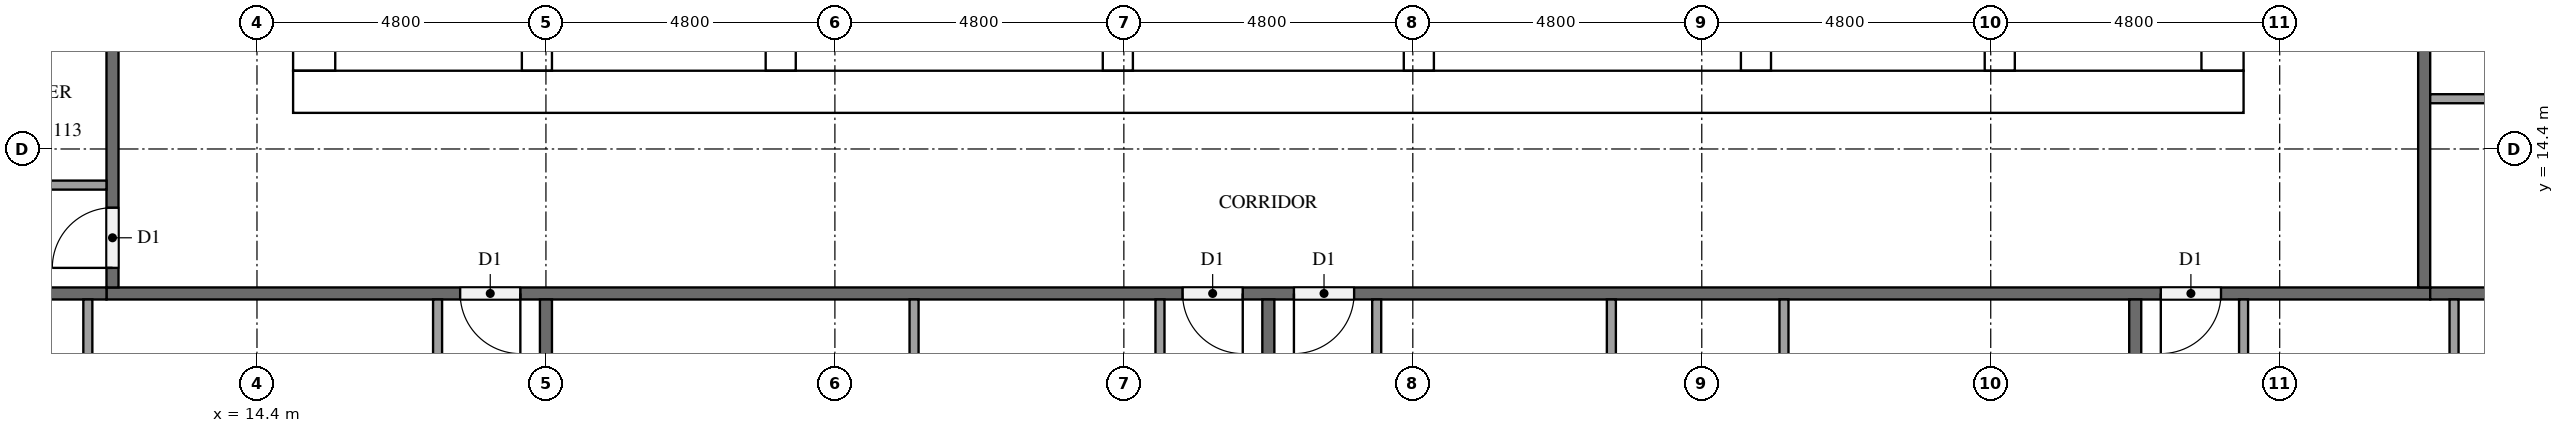
"""IFC4 building model, lengths in metres.
Left out: names, types, materials, properties, quantities, classifications, styles, units other than length and angle.
Written with IfcOpenShell. Run it as: python <this file> out.ifc"""

import sys

from ifc_helpers import new_model, si_unit, direction, frame, frame_2d, origin, place, context, subcontext, project, spatial, rectangle, extrude, element, fill, save


model = new_model("IFC4")
c1 = context("Model", 3, precision=1e-05, world=origin(), true_north=direction((0.0, 1.0)))
c2 = subcontext(c1, "Body", "Model", "MODEL_VIEW")
j1 = project(units=[si_unit("LENGTHUNIT", "METRE"), si_unit("PLANEANGLEUNIT", "RADIAN")], contexts=[c1])
p1 = place(None, origin())
s1 = spatial("IfcSite", under=j1, at=p1, CompositionType="ELEMENT")
p2 = place(p1, origin())
s2 = spatial("IfcBuilding", under=s1, at=p2, CompositionType="ELEMENT")
p3 = place(p2, frame((0.0, 0.0, 196.4)))
s3 = spatial("IfcBuildingStorey", under=s2, at=p3, CompositionType="ELEMENT", Elevation=196.4)
p4 = place(p3, frame((15.0, 15.35, 0.0), z_axis=(0.0, 0.0, 1.0), x_axis=(1.0, 0.0, 0.0)))
e1 = element("IfcWall", 1, at=p4, inside=s3, PredefinedType="SHEAR", context=c2, shape_type="SweptSolid", body=[
    extrude(rectangle(XDim=32.4, YDim=0.7, at=frame_2d((16.2, 0.0))), origin(), (0.0, 0.0, 1.0), 3.2),
])
p5 = place(p4, frame((15.3, 0.0, 0.0)))
e2 = element("IfcOpeningElement", 2, at=p5, cuts=e1, PredefinedType="OPENING", context=c2, shape_type="SweptSolid", body=[
    extrude(rectangle(XDim=1.8, YDim=2.1, at=frame_2d((0.9, 1.05))), frame((0.0, 0.36, 0.0), z_axis=(0.0, -1.0, 0.0), x_axis=(1.0, 0.0, 0.0)), (0.0, 0.0, 1.0), 0.72),
])
p6 = place(p3, frame((15.35, 15.7, 0.0), z_axis=(0.0, 0.0, 1.0), x_axis=(0.0, 1.0, 0.0)))
e3 = element("IfcWall", 3, at=p6, inside=s3, PredefinedType="SHEAR", context=c2, shape_type="SweptSolid", body=[
    extrude(rectangle(XDim=21.4, YDim=0.7, at=frame_2d((10.7, 0.0))), origin(), (0.0, 0.0, 1.0), 3.2),
])
p7 = place(p6, frame((5.06, 0.0, 0.0)))
e4 = element("IfcOpeningElement", 4, at=p7, cuts=e3, PredefinedType="OPENING", context=c2, shape_type="SweptSolid", body=[
    extrude(rectangle(XDim=1.2, YDim=2.1, at=frame_2d((0.6, 1.05))), frame((0.0, 0.36, 0.0), z_axis=(0.0, -1.0, 0.0), x_axis=(1.0, 0.0, 0.0)), (0.0, 0.0, 1.0), 0.72),
])
p8 = place(p3, frame((47.05, 15.7, 0.0), z_axis=(0.0, 0.0, 1.0), x_axis=(0.0, 1.0, 0.0)))
e5 = element("IfcWall", 5, at=p8, inside=s3, PredefinedType="SHEAR", context=c2, shape_type="SweptSolid", body=[
    extrude(rectangle(XDim=21.4, YDim=0.7, at=frame_2d((10.7, 0.0))), origin(), (0.0, 0.0, 1.0), 3.2),
])
p9 = place(p8, frame((10.4, 0.0, 0.0)))
e6 = element("IfcOpeningElement", 6, at=p9, cuts=e5, PredefinedType="OPENING", context=c2, shape_type="SweptSolid", body=[
    extrude(rectangle(XDim=1.2, YDim=2.1, at=frame_2d((0.6, 1.05))), frame((0.0, 0.36, 0.0), z_axis=(0.0, -1.0, 0.0), x_axis=(1.0, 0.0, 0.0)), (0.0, 0.0, 1.0), 0.72),
])
p10 = place(p3, frame((19.05, 15.7, 0.0), z_axis=(0.0, 0.0, 1.0), x_axis=(0.0, 1.0, 0.0)))
e7 = element("IfcWall", 7, at=p10, inside=s3, PredefinedType="SHEAR", context=c2, shape_type="SweptSolid", body=[
    extrude(rectangle(XDim=15.3, YDim=0.5, at=frame_2d((7.65, 0.0))), origin(), (0.0, 0.0, 1.0), 3.2),
])
p11 = place(p10, frame((9.75, 0.0, 0.0)))
e8 = element("IfcOpeningElement", 8, at=p11, cuts=e7, PredefinedType="OPENING", context=c2, shape_type="SweptSolid", body=[
    extrude(rectangle(XDim=1.1, YDim=2.1, at=frame_2d((0.55, 1.05))), frame((0.0, 0.26, 0.0), z_axis=(0.0, -1.0, 0.0), x_axis=(1.0, 0.0, 0.0)), (0.0, 0.0, 1.0), 0.52),
])
p12 = place(p10, frame((13.25, 0.0, 0.0)))
e9 = element("IfcOpeningElement", 9, at=p12, cuts=e7, PredefinedType="OPENING", context=c2, shape_type="SweptSolid", body=[
    extrude(rectangle(XDim=1.1, YDim=2.1, at=frame_2d((0.55, 1.05))), frame((0.0, 0.26, 0.0), z_axis=(0.0, -1.0, 0.0), x_axis=(1.0, 0.0, 0.0)), (0.0, 0.0, 1.0), 0.52),
])
p13 = place(p10, frame((0.5, 0.0, 0.0)))
e10 = element("IfcOpeningElement", 10, at=p13, cuts=e7, PredefinedType="OPENING", context=c2, shape_type="SweptSolid", body=[
    extrude(rectangle(XDim=1.2, YDim=2.1, at=frame_2d((0.6, 1.05))), frame((0.0, 0.26, 0.0), z_axis=(0.0, -1.0, 0.0), x_axis=(1.0, 0.0, 0.0)), (0.0, 0.0, 1.0), 0.52),
])
p14 = place(p3, frame((23.1, 15.7, 0.0), z_axis=(0.0, 0.0, 1.0), x_axis=(0.0, 1.0, 0.0)))
e11 = element("IfcWall", 11, at=p14, inside=s3, PredefinedType="SHEAR", context=c2, shape_type="SweptSolid", body=[
    extrude(rectangle(XDim=21.4, YDim=0.5, at=frame_2d((10.7, 0.0))), origin(), (0.0, 0.0, 1.0), 3.2),
])
p15 = place(p3, frame((39.3, 15.7, 0.0), z_axis=(0.0, 0.0, 1.0), x_axis=(0.0, 1.0, 0.0)))
e12 = element("IfcWall", 12, at=p15, inside=s3, PredefinedType="SHEAR", context=c2, shape_type="SweptSolid", body=[
    extrude(rectangle(XDim=8.55, YDim=0.5, at=frame_2d((4.275, 0.0))), origin(), (0.0, 0.0, 1.0), 3.2),
])
p16 = place(p3, frame((43.35, 15.7, 0.0), z_axis=(0.0, 0.0, 1.0), x_axis=(0.0, 1.0, 0.0)))
e13 = element("IfcWall", 13, at=p16, inside=s3, PredefinedType="SHEAR", context=c2, shape_type="SweptSolid", body=[
    extrude(rectangle(XDim=8.55, YDim=0.5, at=frame_2d((4.275, 0.0))), origin(), (0.0, 0.0, 1.0), 3.2),
])
p17 = place(p16, frame((0.5, 0.0, 0.0)))
e14 = element("IfcOpeningElement", 14, at=p17, cuts=e13, PredefinedType="OPENING", context=c2, shape_type="SweptSolid", body=[
    extrude(rectangle(XDim=1.2, YDim=2.1, at=frame_2d((0.6, 1.05))), frame((0.0, 0.26, 0.0), z_axis=(0.0, -1.0, 0.0), x_axis=(1.0, 0.0, 0.0)), (0.0, 0.0, 1.0), 0.52),
])
for number, where, z_axis, x_axis in (
    (15, (28.7, 15.7, 0.0), (0.0, 0.0, 1.0), (0.0, 1.0, 0.0)),
    (16, (33.7, 15.7, 0.0), (0.0, 0.0, 1.0), (0.0, 1.0, 0.0)),
):
    element("IfcWall", number, at=place(p3, frame(where, z_axis=z_axis, x_axis=x_axis)), inside=s3, PredefinedType="SHEAR", context=c2, shape_type="SweptSolid", body=[
        extrude(rectangle(XDim=2.8, YDim=0.5, at=frame_2d((1.4, 0.0))), origin(), (0.0, 0.0, 1.0), 3.2),
    ])
p18 = place(p3, frame((50.5, 12.0, 0.0), z_axis=(0.0, 0.0, 1.0), x_axis=(-1.0, 0.0, 0.0)))
e17 = element("IfcWall", 17, at=p18, inside=s3, PredefinedType="PARTITIONING", context=c2, shape_type="SweptSolid", body=[
    extrude(rectangle(XDim=38.6, YDim=0.2, at=frame_2d((19.3, 0.0))), origin(), (0.0, 0.0, 1.0), 3.2),
])
p19 = place(p18, frame((31.725, 0.0, 0.0)))
e18 = element("IfcOpeningElement", 18, at=p19, cuts=e17, PredefinedType="OPENING", context=c2, shape_type="SweptSolid", body=[
    extrude(rectangle(XDim=1.0, YDim=2.1, at=frame_2d((0.5, 1.05))), frame((0.0, 0.11, 0.0), z_axis=(0.0, -1.0, 0.0), x_axis=(1.0, 0.0, 0.0)), (0.0, 0.0, 1.0), 0.22),
])
p20 = place(p18, frame((19.725, 0.0, 0.0)))
e19 = element("IfcOpeningElement", 19, at=p20, cuts=e17, PredefinedType="OPENING", context=c2, shape_type="SweptSolid", body=[
    extrude(rectangle(XDim=1.0, YDim=2.1, at=frame_2d((0.5, 1.05))), frame((0.0, 0.11, 0.0), z_axis=(0.0, -1.0, 0.0), x_axis=(1.0, 0.0, 0.0)), (0.0, 0.0, 1.0), 0.22),
])
p21 = place(p18, frame((17.875, 0.0, 0.0)))
e20 = element("IfcOpeningElement", 20, at=p21, cuts=e17, PredefinedType="OPENING", context=c2, shape_type="SweptSolid", body=[
    extrude(rectangle(XDim=1.0, YDim=2.1, at=frame_2d((0.5, 1.05))), frame((0.0, 0.11, 0.0), z_axis=(0.0, -1.0, 0.0), x_axis=(1.0, 0.0, 0.0)), (0.0, 0.0, 1.0), 0.22),
])
p22 = place(p18, frame((3.475, 0.0, 0.0)))
e21 = element("IfcOpeningElement", 21, at=p22, cuts=e17, PredefinedType="OPENING", context=c2, shape_type="SweptSolid", body=[
    extrude(rectangle(XDim=1.0, YDim=2.1, at=frame_2d((0.5, 1.05))), frame((0.0, 0.11, 0.0), z_axis=(0.0, -1.0, 0.0), x_axis=(1.0, 0.0, 0.0)), (0.0, 0.0, 1.0), 0.22),
])
p23 = place(p3, frame((50.4, 40.7, 0.0), z_axis=(0.0, 0.0, 1.0), x_axis=(0.0, -1.0, 0.0)))
e22 = element("IfcWall", 22, at=p23, inside=s3, PredefinedType="PARTITIONING", context=c2, shape_type="SweptSolid", body=[
    extrude(rectangle(XDim=28.6, YDim=0.2, at=frame_2d((14.3, 0.0))), origin(), (0.0, 0.0, 1.0), 3.2),
])
p24 = place(p23, frame((21.925, 0.0, 0.0)))
e23 = element("IfcOpeningElement", 23, at=p24, cuts=e22, PredefinedType="OPENING", context=c2, shape_type="SweptSolid", body=[
    extrude(rectangle(XDim=1.0, YDim=2.1, at=frame_2d((0.5, 1.05))), frame((0.0, 0.11, 0.0), z_axis=(0.0, -1.0, 0.0), x_axis=(1.0, 0.0, 0.0)), (0.0, 0.0, 1.0), 0.22),
])
p25 = place(p23, frame((20.075, 0.0, 0.0)))
e24 = element("IfcOpeningElement", 24, at=p25, cuts=e22, PredefinedType="OPENING", context=c2, shape_type="SweptSolid", body=[
    extrude(rectangle(XDim=1.0, YDim=2.1, at=frame_2d((0.5, 1.05))), frame((0.0, 0.11, 0.0), z_axis=(0.0, -1.0, 0.0), x_axis=(1.0, 0.0, 0.0)), (0.0, 0.0, 1.0), 0.22),
])
p26 = place(p23, frame((0.325, 0.0, 0.0)))
e25 = element("IfcOpeningElement", 25, at=p26, cuts=e22, PredefinedType="OPENING", context=c2, shape_type="SweptSolid", body=[
    extrude(rectangle(XDim=1.0, YDim=2.1, at=frame_2d((0.5, 1.05))), frame((0.0, 0.11, 0.0), z_axis=(0.0, -1.0, 0.0), x_axis=(1.0, 0.0, 0.0)), (0.0, 0.0, 1.0), 0.22),
])
p27 = place(p3, frame((12.0, 12.1, 0.0), z_axis=(0.0, 0.0, 1.0), x_axis=(0.0, 1.0, 0.0)))
e26 = element("IfcWall", 26, at=p27, inside=s3, PredefinedType="PARTITIONING", context=c2, shape_type="SweptSolid", body=[
    extrude(rectangle(XDim=28.6, YDim=0.2, at=frame_2d((14.3, 0.0))), origin(), (0.0, 0.0, 1.0), 3.2),
])
p28 = place(p27, frame((27.275, 0.0, 0.0)))
e27 = element("IfcOpeningElement", 27, at=p28, cuts=e26, PredefinedType="OPENING", context=c2, shape_type="SweptSolid", body=[
    extrude(rectangle(XDim=1.0, YDim=2.1, at=frame_2d((0.5, 1.05))), frame((0.0, 0.11, 0.0), z_axis=(0.0, -1.0, 0.0), x_axis=(1.0, 0.0, 0.0)), (0.0, 0.0, 1.0), 0.22),
])
p29 = place(p27, frame((0.325, 0.0, 0.0)))
e28 = element("IfcOpeningElement", 28, at=p29, cuts=e26, PredefinedType="OPENING", context=c2, shape_type="SweptSolid", body=[
    extrude(rectangle(XDim=1.0, YDim=2.1, at=frame_2d((0.5, 1.05))), frame((0.0, 0.11, 0.0), z_axis=(0.0, -1.0, 0.0), x_axis=(1.0, 0.0, 0.0)), (0.0, 0.0, 1.0), 0.22),
])
p30 = place(p3, frame((19.2, 11.9, 0.0), z_axis=(0.0, 0.0, 1.0), x_axis=(0.0, -1.0, 0.0)))
e29 = element("IfcWall", 29, at=p30, inside=s3, PredefinedType="PARTITIONING", context=c2, shape_type="SweptSolid", body=[
    extrude(rectangle(XDim=11.575, YDim=0.2, at=frame_2d((5.788, 0.0))), origin(), (0.0, 0.0, 1.0), 3.2),
])
p31 = place(p3, frame((4.9, 12.0, 0.0), z_axis=(0.0, 0.0, 1.0), x_axis=(1.0, 0.0, 0.0)))
e30 = element("IfcWall", 30, at=p31, inside=s3, PredefinedType="PARTITIONING", context=c2, shape_type="SweptSolid", body=[
    extrude(rectangle(XDim=7.0, YDim=0.2, at=frame_2d((3.5, 0.0))), origin(), (0.0, 0.0, 1.0), 3.2),
])
for number, where, z_axis, x_axis in (
    (31, (31.2, 11.9, 0.0), (0.0, 0.0, 1.0), (0.0, -1.0, 0.0)),
    (32, (45.6, 11.9, 0.0), (0.0, 0.0, 1.0), (0.0, -1.0, 0.0)),
):
    element("IfcWall", number, at=place(p3, frame(where, z_axis=z_axis, x_axis=x_axis)), inside=s3, PredefinedType="PARTITIONING", context=c2, shape_type="SweptSolid", body=[
        extrude(rectangle(XDim=11.8, YDim=0.2, at=frame_2d((5.9, 0.0))), origin(), (0.0, 0.0, 1.0), 3.2),
    ])
p32 = place(p3, frame((50.5, 12.0, 0.0), z_axis=(0.0, 0.0, 1.0), x_axis=(1.0, 0.0, 0.0)))
e33 = element("IfcWall", 33, at=p32, inside=s3, PredefinedType="PARTITIONING", context=c2, shape_type="SweptSolid", body=[
    extrude(rectangle(XDim=11.8, YDim=0.2, at=frame_2d((5.9, 0.0))), origin(), (0.0, 0.0, 1.0), 3.2),
])
p33 = place(p3, frame((11.59, 11.9, 0.0), z_axis=(0.0, 0.0, 1.0), x_axis=(0.0, -1.0, 0.0)))
e34 = element("IfcWall", 34, at=p33, inside=s3, PredefinedType="PARTITIONING", context=c2, shape_type="SweptSolid", body=[
    extrude(rectangle(XDim=4.175, YDim=0.15, at=frame_2d((2.087, 0.0))), origin(), (0.0, 0.0, 1.0), 3.2),
])
p34 = place(p3, frame((17.4, 11.9, 0.0), z_axis=(0.0, 0.0, 1.0), x_axis=(0.0, -1.0, 0.0)))
e35 = element("IfcWall", 35, at=p34, inside=s3, PredefinedType="PARTITIONING", context=c2, shape_type="SweptSolid", body=[
    extrude(rectangle(XDim=4.325, YDim=0.15, at=frame_2d((2.163, 0.0))), origin(), (0.0, 0.0, 1.0), 3.2),
])
p35 = place(p3, frame((25.315, 11.9, 0.0), z_axis=(0.0, 0.0, 1.0), x_axis=(0.0, -1.0, 0.0)))
e36 = element("IfcWall", 36, at=p35, inside=s3, PredefinedType="PARTITIONING", context=c2, shape_type="SweptSolid", body=[
    extrude(rectangle(XDim=4.475, YDim=0.15, at=frame_2d((2.237, 0.0))), origin(), (0.0, 0.0, 1.0), 3.2),
])
p36 = place(p3, frame((29.4, 11.9, 0.0), z_axis=(0.0, 0.0, 1.0), x_axis=(0.0, -1.0, 0.0)))
e37 = element("IfcWall", 37, at=p36, inside=s3, PredefinedType="PARTITIONING", context=c2, shape_type="SweptSolid", body=[
    extrude(rectangle(XDim=4.625, YDim=0.15, at=frame_2d((2.312, 0.0))), origin(), (0.0, 0.0, 1.0), 3.2),
])
for number, where, z_axis, x_axis in (
    (38, (36.898, 11.9, 0.0), (0.0, 0.0, 1.0), (0.0, -1.0, 0.0)),
    (39, (39.765, 11.9, 0.0), (0.0, 0.0, 1.0), (0.0, -1.0, 0.0)),
):
    element("IfcWall", number, at=place(p3, frame(where, z_axis=z_axis, x_axis=x_axis)), inside=s3, PredefinedType="PARTITIONING", context=c2, shape_type="SweptSolid", body=[
        extrude(rectangle(XDim=3.575, YDim=0.15, at=frame_2d((1.788, 0.0))), origin(), (0.0, 0.0, 1.0), 3.2),
    ])
p37 = place(p3, frame((33.0, 11.9, 0.0), z_axis=(0.0, 0.0, 1.0), x_axis=(0.0, -1.0, 0.0)))
e40 = element("IfcWall", 40, at=p37, inside=s3, PredefinedType="PARTITIONING", context=c2, shape_type="SweptSolid", body=[
    extrude(rectangle(XDim=3.725, YDim=0.15, at=frame_2d((1.862, 0.0))), origin(), (0.0, 0.0, 1.0), 3.2),
])
p38 = place(p3, frame((50.896, 11.9, 0.0), z_axis=(0.0, 0.0, 1.0), x_axis=(0.0, -1.0, 0.0)))
e41 = element("IfcWall", 41, at=p38, inside=s3, PredefinedType="PARTITIONING", context=c2, shape_type="SweptSolid", body=[
    extrude(rectangle(XDim=4.175, YDim=0.15, at=frame_2d((2.087, 0.0))), origin(), (0.0, 0.0, 1.0), 3.2),
])
p39 = place(p3, frame((47.4, 11.9, 0.0), z_axis=(0.0, 0.0, 1.0), x_axis=(0.0, -1.0, 0.0)))
e42 = element("IfcWall", 42, at=p39, inside=s3, PredefinedType="PARTITIONING", context=c2, shape_type="SweptSolid", body=[
    extrude(rectangle(XDim=4.325, YDim=0.15, at=frame_2d((2.163, 0.0))), origin(), (0.0, 0.0, 1.0), 3.2),
])
p40 = place(p3, frame((50.5, 15.235, 0.0), z_axis=(0.0, 0.0, 1.0), x_axis=(1.0, 0.0, 0.0)))
e43 = element("IfcWall", 43, at=p40, inside=s3, PredefinedType="PARTITIONING", context=c2, shape_type="SweptSolid", body=[
    extrude(rectangle(XDim=3.875, YDim=0.15, at=frame_2d((1.938, 0.0))), origin(), (0.0, 0.0, 1.0), 3.2),
])
p41 = place(p3, frame((11.9, 13.8, 0.0), z_axis=(0.0, 0.0, 1.0), x_axis=(-1.0, 0.0, 0.0)))
e44 = element("IfcWall", 44, at=p41, inside=s3, PredefinedType="PARTITIONING", context=c2, shape_type="SweptSolid", body=[
    extrude(rectangle(XDim=2.525, YDim=0.15, at=frame_2d((1.262, 0.0))), origin(), (0.0, 0.0, 1.0), 3.2),
])
p42 = place(p5, frame((1.8, 0.0, 0.0), z_axis=(0.0, 0.0, 1.0), x_axis=(-1.0, 0.0, 0.0)))
e45 = element("IfcDoor", 45, at=p42, inside=s3, OperationType="DOUBLE_DOOR_SINGLE_SWING", PredefinedType="DOOR", context=c2, shape_type="SweptSolid", body=[
    extrude(rectangle(XDim=1.8, YDim=2.1, at=frame_2d((0.9, 1.05))), frame((0.0, 0.025, 0.0), z_axis=(0.0, -1.0, 0.0), x_axis=(1.0, 0.0, 0.0)), (0.0, 0.0, 1.0), 0.05),
])
fill(e2, e45)
p43 = place(p19, origin())
e46 = element("IfcDoor", 46, at=p43, inside=s3, OperationType="SINGLE_SWING_LEFT", PredefinedType="DOOR", context=c2, shape_type="SweptSolid", body=[
    extrude(rectangle(XDim=1.0, YDim=2.1, at=frame_2d((0.5, 1.05))), frame((0.0, 0.025, 0.0), z_axis=(0.0, -1.0, 0.0), x_axis=(1.0, 0.0, 0.0)), (0.0, 0.0, 1.0), 0.05),
])
fill(e18, e46)
p44 = place(p20, origin())
e47 = element("IfcDoor", 47, at=p44, inside=s3, OperationType="SINGLE_SWING_LEFT", PredefinedType="DOOR", context=c2, shape_type="SweptSolid", body=[
    extrude(rectangle(XDim=1.0, YDim=2.1, at=frame_2d((0.5, 1.05))), frame((0.0, 0.025, 0.0), z_axis=(0.0, -1.0, 0.0), x_axis=(1.0, 0.0, 0.0)), (0.0, 0.0, 1.0), 0.05),
])
fill(e19, e47)
p45 = place(p21, origin())
e48 = element("IfcDoor", 48, at=p45, inside=s3, OperationType="SINGLE_SWING_RIGHT", PredefinedType="DOOR", context=c2, shape_type="SweptSolid", body=[
    extrude(rectangle(XDim=1.0, YDim=2.1, at=frame_2d((0.5, 1.05))), frame((0.0, 0.025, 0.0), z_axis=(0.0, -1.0, 0.0), x_axis=(1.0, 0.0, 0.0)), (0.0, 0.0, 1.0), 0.05),
])
fill(e20, e48)
p46 = place(p22, origin())
e49 = element("IfcDoor", 49, at=p46, inside=s3, OperationType="SINGLE_SWING_RIGHT", PredefinedType="DOOR", context=c2, shape_type="SweptSolid", body=[
    extrude(rectangle(XDim=1.0, YDim=2.1, at=frame_2d((0.5, 1.05))), frame((0.0, 0.025, 0.0), z_axis=(0.0, -1.0, 0.0), x_axis=(1.0, 0.0, 0.0)), (0.0, 0.0, 1.0), 0.05),
])
fill(e21, e49)
p47 = place(p29, origin())
e50 = element("IfcDoor", 50, at=p47, inside=s3, OperationType="SINGLE_SWING_LEFT", PredefinedType="DOOR", context=c2, shape_type="SweptSolid", body=[
    extrude(rectangle(XDim=1.0, YDim=2.1, at=frame_2d((0.5, 1.05))), frame((0.0, 0.025, 0.0), z_axis=(0.0, -1.0, 0.0), x_axis=(1.0, 0.0, 0.0)), (0.0, 0.0, 1.0), 0.05),
])
fill(e28, e50)
save(model, sys.argv[1])
